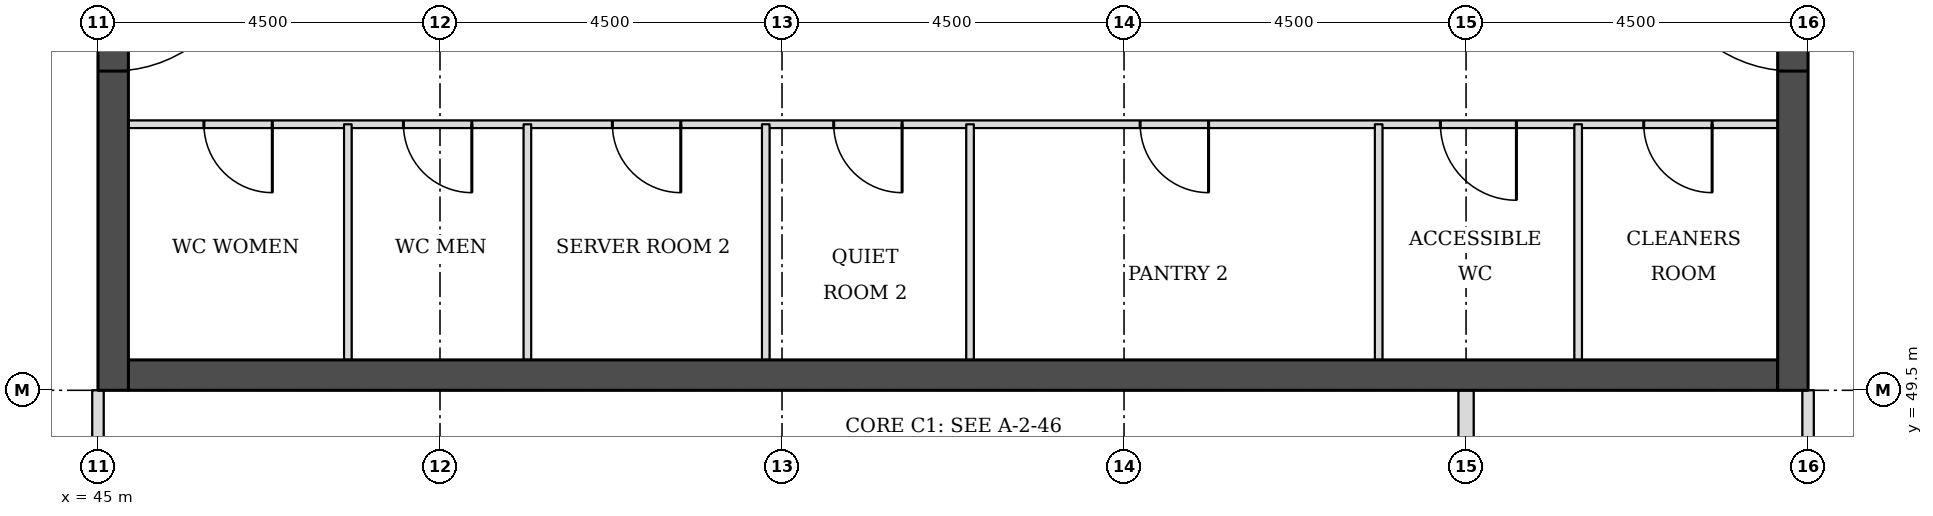
"""IFC4 building model, lengths in metres.
Left out: names, types, materials, properties, quantities, classifications, styles, units other than length and angle.
Written with IfcOpenShell. Run it as: python <this file> out.ifc"""

import sys

from ifc_helpers import new_model, si_unit, direction, frame, frame_2d, origin, place, context, subcontext, project, spatial, rectangle, extrude, element, fill, save


model = new_model("IFC4")
c1 = context("Model", 3, precision=1e-05, world=origin(), true_north=direction((0.0, 1.0)))
c2 = subcontext(c1, "Body", "Model", "MODEL_VIEW")
j1 = project(units=[si_unit("LENGTHUNIT", "METRE"), si_unit("PLANEANGLEUNIT", "RADIAN")], contexts=[c1])
p1 = place(None, origin())
s1 = spatial("IfcSite", under=j1, at=p1, CompositionType="ELEMENT")
p2 = place(p1, origin())
s2 = spatial("IfcBuilding", under=s1, at=p2, CompositionType="ELEMENT")
p3 = place(p2, frame((0.0, 0.0, 184.7)))
s3 = spatial("IfcBuildingStorey", under=s2, at=p3, CompositionType="ELEMENT", Elevation=184.7)
p4 = place(p3, frame((45.4, 49.7, 0.0), z_axis=(0.0, 0.0, 1.0), x_axis=(1.0, 0.0, 0.0)))
e1 = element("IfcWall", 1, at=p4, inside=s3, PredefinedType="SHEAR", context=c2, shape_type="SweptSolid", body=[
    extrude(rectangle(XDim=21.7, YDim=0.4, at=frame_2d((10.85, 0.0))), origin(), (0.0, 0.0, 1.0), 3.7),
])
p5 = place(p3, frame((45.2, 49.5, 0.0), z_axis=(0.0, 0.0, 1.0), x_axis=(0.0, 1.0, 0.0)))
e2 = element("IfcWall", 2, at=p5, inside=s3, PredefinedType="SHEAR", context=c2, shape_type="SweptSolid", body=[
    extrude(rectangle(XDim=22.5, YDim=0.4, at=frame_2d((11.25, 0.0))), origin(), (0.0, 0.0, 1.0), 3.7),
])
p6 = place(p5, frame((4.2, 0.0, 0.0)))
e3 = element("IfcOpeningElement", 3, at=p6, cuts=e2, PredefinedType="OPENING", context=c2, shape_type="SweptSolid", body=[
    extrude(rectangle(XDim=1.8, YDim=2.1, at=frame_2d((0.9, 1.05))), frame((0.0, 0.21, 0.0), z_axis=(0.0, -1.0, 0.0), x_axis=(1.0, 0.0, 0.0)), (0.0, 0.0, 1.0), 0.42),
])
p7 = place(p5, frame((6.9, 0.0, 0.0)))
e4 = element("IfcOpeningElement", 4, at=p7, cuts=e2, PredefinedType="OPENING", context=c2, shape_type="SweptSolid", body=[
    extrude(rectangle(XDim=1.1, YDim=2.1, at=frame_2d((0.55, 1.05))), frame((0.0, 0.21, 0.0), z_axis=(0.0, -1.0, 0.0), x_axis=(1.0, 0.0, 0.0)), (0.0, 0.0, 1.0), 0.42),
])
p8 = place(p5, frame((13.6, 0.0, 0.0)))
e5 = element("IfcOpeningElement", 5, at=p8, cuts=e2, PredefinedType="OPENING", context=c2, shape_type="SweptSolid", body=[
    extrude(rectangle(XDim=1.1, YDim=2.1, at=frame_2d((0.55, 1.05))), frame((0.0, 0.21, 0.0), z_axis=(0.0, -1.0, 0.0), x_axis=(1.0, 0.0, 0.0)), (0.0, 0.0, 1.0), 0.42),
])
p9 = place(p5, frame((16.5, 0.0, 0.0)))
e6 = element("IfcOpeningElement", 6, at=p9, cuts=e2, PredefinedType="OPENING", context=c2, shape_type="SweptSolid", body=[
    extrude(rectangle(XDim=1.8, YDim=2.1, at=frame_2d((0.9, 1.05))), frame((0.0, 0.21, 0.0), z_axis=(0.0, -1.0, 0.0), x_axis=(1.0, 0.0, 0.0)), (0.0, 0.0, 1.0), 0.42),
])
p10 = place(p3, frame((67.3, 49.5, 0.0), z_axis=(0.0, 0.0, 1.0), x_axis=(0.0, 1.0, 0.0)))
e7 = element("IfcWall", 7, at=p10, inside=s3, PredefinedType="SHEAR", context=c2, shape_type="SweptSolid", body=[
    extrude(rectangle(XDim=22.5, YDim=0.4, at=frame_2d((11.25, 0.0))), origin(), (0.0, 0.0, 1.0), 3.7),
])
p11 = place(p10, frame((4.2, 0.0, 0.0)))
e8 = element("IfcOpeningElement", 8, at=p11, cuts=e7, PredefinedType="OPENING", context=c2, shape_type="SweptSolid", body=[
    extrude(rectangle(XDim=1.8, YDim=2.1, at=frame_2d((0.9, 1.05))), frame((0.0, 0.21, 0.0), z_axis=(0.0, -1.0, 0.0), x_axis=(1.0, 0.0, 0.0)), (0.0, 0.0, 1.0), 0.42),
])
p12 = place(p10, frame((6.9, 0.0, 0.0)))
e9 = element("IfcOpeningElement", 9, at=p12, cuts=e7, PredefinedType="OPENING", context=c2, shape_type="SweptSolid", body=[
    extrude(rectangle(XDim=1.1, YDim=2.1, at=frame_2d((0.55, 1.05))), frame((0.0, 0.21, 0.0), z_axis=(0.0, -1.0, 0.0), x_axis=(1.0, 0.0, 0.0)), (0.0, 0.0, 1.0), 0.42),
])
p13 = place(p10, frame((13.6, 0.0, 0.0)))
e10 = element("IfcOpeningElement", 10, at=p13, cuts=e7, PredefinedType="OPENING", context=c2, shape_type="SweptSolid", body=[
    extrude(rectangle(XDim=1.1, YDim=2.1, at=frame_2d((0.55, 1.05))), frame((0.0, 0.21, 0.0), z_axis=(0.0, -1.0, 0.0), x_axis=(1.0, 0.0, 0.0)), (0.0, 0.0, 1.0), 0.42),
])
p14 = place(p10, frame((16.5, 0.0, 0.0)))
e11 = element("IfcOpeningElement", 11, at=p14, cuts=e7, PredefinedType="OPENING", context=c2, shape_type="SweptSolid", body=[
    extrude(rectangle(XDim=1.8, YDim=2.1, at=frame_2d((0.9, 1.05))), frame((0.0, 0.21, 0.0), z_axis=(0.0, -1.0, 0.0), x_axis=(1.0, 0.0, 0.0)), (0.0, 0.0, 1.0), 0.42),
])
p15 = place(p3, frame((67.5, 45.0, 0.0), z_axis=(0.0, 0.0, 1.0), x_axis=(0.0, 1.0, 0.0)))
e12 = element("IfcWall", 12, at=p15, inside=s3, PredefinedType="PARTITIONING", context=c2, shape_type="SweptSolid", body=[
    extrude(rectangle(XDim=4.5, YDim=0.15, at=frame_2d((2.25, 0.0))), origin(), (0.0, 0.0, 1.0), 3.022),
])
p16 = place(p3, frame((63.0, 46.5, 0.0), z_axis=(0.0, 0.0, 1.0), x_axis=(0.0, 1.0, 0.0)))
e13 = element("IfcWall", 13, at=p16, inside=s3, PredefinedType="PARTITIONING", context=c2, shape_type="SweptSolid", body=[
    extrude(rectangle(XDim=3.0, YDim=0.2, at=frame_2d((1.5, 0.0))), origin(), (0.0, 0.0, 1.0), 3.55),
])
p17 = place(p3, frame((45.0, 48.0, 0.0), z_axis=(0.0, 0.0, 1.0), x_axis=(0.0, 1.0, 0.0)))
e14 = element("IfcWall", 14, at=p17, inside=s3, PredefinedType="PARTITIONING", context=c2, shape_type="SweptSolid", body=[
    extrude(rectangle(XDim=1.5, YDim=0.15, at=frame_2d((0.75, 0.0))), origin(), (0.0, 0.0, 1.0), 3.022),
])
p18 = place(p3, frame((45.4, 53.0, 0.0), z_axis=(0.0, 0.0, 1.0), x_axis=(1.0, 0.0, 0.0)))
e15 = element("IfcWall", 15, at=p18, inside=s3, PredefinedType="PARTITIONING", context=c2, shape_type="SweptSolid", body=[
    extrude(rectangle(XDim=21.7, YDim=0.1, at=frame_2d((10.85, 0.0))), origin(), (0.0, 0.0, 1.0), 3.55),
])
p19 = place(p18, frame((19.938, 0.0, 0.0)))
e16 = element("IfcOpeningElement", 16, at=p19, cuts=e15, PredefinedType="OPENING", context=c2, shape_type="SweptSolid", body=[
    extrude(rectangle(XDim=0.9, YDim=2.1, at=frame_2d((0.45, 1.05))), frame((0.0, 0.06, 0.0), z_axis=(0.0, -1.0, 0.0), x_axis=(1.0, 0.0, 0.0)), (0.0, 0.0, 1.0), 0.12),
])
p20 = place(p18, frame((17.262, 0.0, 0.0)))
e17 = element("IfcOpeningElement", 17, at=p20, cuts=e15, PredefinedType="OPENING", context=c2, shape_type="SweptSolid", body=[
    extrude(rectangle(XDim=1.0, YDim=2.1, at=frame_2d((0.5, 1.05))), frame((0.0, 0.06, 0.0), z_axis=(0.0, -1.0, 0.0), x_axis=(1.0, 0.0, 0.0)), (0.0, 0.0, 1.0), 0.12),
])
p21 = place(p18, frame((0.994, 0.0, 0.0)))
e18 = element("IfcOpeningElement", 18, at=p21, cuts=e15, PredefinedType="OPENING", context=c2, shape_type="SweptSolid", body=[
    extrude(rectangle(XDim=0.9, YDim=2.1, at=frame_2d((0.45, 1.05))), frame((0.0, 0.06, 0.0), z_axis=(0.0, -1.0, 0.0), x_axis=(1.0, 0.0, 0.0)), (0.0, 0.0, 1.0), 0.12),
])
p22 = place(p18, frame((3.619, 0.0, 0.0)))
e19 = element("IfcOpeningElement", 19, at=p22, cuts=e15, PredefinedType="OPENING", context=c2, shape_type="SweptSolid", body=[
    extrude(rectangle(XDim=0.9, YDim=2.1, at=frame_2d((0.45, 1.05))), frame((0.0, 0.06, 0.0), z_axis=(0.0, -1.0, 0.0), x_axis=(1.0, 0.0, 0.0)), (0.0, 0.0, 1.0), 0.12),
])
p23 = place(p18, frame((6.368, 0.0, 0.0)))
e20 = element("IfcOpeningElement", 20, at=p23, cuts=e15, PredefinedType="OPENING", context=c2, shape_type="SweptSolid", body=[
    extrude(rectangle(XDim=0.9, YDim=2.1, at=frame_2d((0.45, 1.05))), frame((0.0, 0.06, 0.0), z_axis=(0.0, -1.0, 0.0), x_axis=(1.0, 0.0, 0.0)), (0.0, 0.0, 1.0), 0.12),
])
p24 = place(p18, frame((9.28, 0.0, 0.0)))
e21 = element("IfcOpeningElement", 21, at=p24, cuts=e15, PredefinedType="OPENING", context=c2, shape_type="SweptSolid", body=[
    extrude(rectangle(XDim=0.9, YDim=2.1, at=frame_2d((0.45, 1.05))), frame((0.0, 0.06, 0.0), z_axis=(0.0, -1.0, 0.0), x_axis=(1.0, 0.0, 0.0)), (0.0, 0.0, 1.0), 0.12),
])
p25 = place(p18, frame((13.312, 0.0, 0.0)))
e22 = element("IfcOpeningElement", 22, at=p25, cuts=e15, PredefinedType="OPENING", context=c2, shape_type="SweptSolid", body=[
    extrude(rectangle(XDim=0.9, YDim=2.1, at=frame_2d((0.45, 1.05))), frame((0.0, 0.06, 0.0), z_axis=(0.0, -1.0, 0.0), x_axis=(1.0, 0.0, 0.0)), (0.0, 0.0, 1.0), 0.12),
])
for number, where, z_axis, x_axis in (
    (23, (48.288, 49.9, 0.0), (0.0, 0.0, 1.0), (0.0, 1.0, 0.0)),
    (24, (50.65, 49.9, 0.0), (0.0, 0.0, 1.0), (0.0, 1.0, 0.0)),
    (25, (53.786, 49.9, 0.0), (0.0, 0.0, 1.0), (0.0, 1.0, 0.0)),
    (26, (56.474, 49.9, 0.0), (0.0, 0.0, 1.0), (0.0, 1.0, 0.0)),
    (27, (61.85, 49.9, 0.0), (0.0, 0.0, 1.0), (0.0, 1.0, 0.0)),
    (28, (64.475, 49.9, 0.0), (0.0, 0.0, 1.0), (0.0, 1.0, 0.0)),
):
    element("IfcWall", number, at=place(p3, frame(where, z_axis=z_axis, x_axis=x_axis)), inside=s3, PredefinedType="PARTITIONING", context=c2, shape_type="SweptSolid", body=[
        extrude(rectangle(XDim=3.1, YDim=0.1, at=frame_2d((1.55, 0.0))), origin(), (0.0, 0.0, 1.0), 3.55),
    ])
p26 = place(p6, frame((1.8, 0.0, 0.0), z_axis=(0.0, 0.0, 1.0), x_axis=(-1.0, 0.0, 0.0)))
e29 = element("IfcDoor", 29, at=p26, inside=s3, OperationType="SINGLE_SWING_LEFT", PredefinedType="DOOR", context=c2, shape_type="SweptSolid", body=[
    extrude(rectangle(XDim=1.8, YDim=2.1, at=frame_2d((0.9, 1.05))), frame((0.0, 0.025, 0.0), z_axis=(0.0, -1.0, 0.0), x_axis=(1.0, 0.0, 0.0)), (0.0, 0.0, 1.0), 0.05),
])
fill(e3, e29)
p27 = place(p11, origin())
e30 = element("IfcDoor", 30, at=p27, inside=s3, OperationType="SINGLE_SWING_RIGHT", PredefinedType="DOOR", context=c2, shape_type="SweptSolid", body=[
    extrude(rectangle(XDim=1.8, YDim=2.1, at=frame_2d((0.9, 1.05))), frame((0.0, 0.025, 0.0), z_axis=(0.0, -1.0, 0.0), x_axis=(1.0, 0.0, 0.0)), (0.0, 0.0, 1.0), 0.05),
])
fill(e8, e30)
p28 = place(p19, frame((0.9, 0.0, 0.0), z_axis=(0.0, 0.0, 1.0), x_axis=(-1.0, 0.0, 0.0)))
e31 = element("IfcDoor", 31, at=p28, inside=s3, OperationType="SINGLE_SWING_LEFT", PredefinedType="DOOR", context=c2, shape_type="SweptSolid", body=[
    extrude(rectangle(XDim=0.9, YDim=2.1, at=frame_2d((0.45, 1.05))), frame((0.0, 0.025, 0.0), z_axis=(0.0, -1.0, 0.0), x_axis=(1.0, 0.0, 0.0)), (0.0, 0.0, 1.0), 0.05),
])
fill(e16, e31)
p29 = place(p20, frame((1.0, 0.0, 0.0), z_axis=(0.0, 0.0, 1.0), x_axis=(-1.0, 0.0, 0.0)))
e32 = element("IfcDoor", 32, at=p29, inside=s3, OperationType="SINGLE_SWING_LEFT", PredefinedType="DOOR", context=c2, shape_type="SweptSolid", body=[
    extrude(rectangle(XDim=1.0, YDim=2.1, at=frame_2d((0.5, 1.05))), frame((0.0, 0.025, 0.0), z_axis=(0.0, -1.0, 0.0), x_axis=(1.0, 0.0, 0.0)), (0.0, 0.0, 1.0), 0.05),
])
fill(e17, e32)
p30 = place(p21, frame((0.9, 0.0, 0.0), z_axis=(0.0, 0.0, 1.0), x_axis=(-1.0, 0.0, 0.0)))
e33 = element("IfcDoor", 33, at=p30, inside=s3, OperationType="SINGLE_SWING_LEFT", PredefinedType="DOOR", context=c2, shape_type="SweptSolid", body=[
    extrude(rectangle(XDim=0.9, YDim=2.1, at=frame_2d((0.45, 1.05))), frame((0.0, 0.025, 0.0), z_axis=(0.0, -1.0, 0.0), x_axis=(1.0, 0.0, 0.0)), (0.0, 0.0, 1.0), 0.05),
])
fill(e18, e33)
p31 = place(p22, frame((0.9, 0.0, 0.0), z_axis=(0.0, 0.0, 1.0), x_axis=(-1.0, 0.0, 0.0)))
e34 = element("IfcDoor", 34, at=p31, inside=s3, OperationType="SINGLE_SWING_LEFT", PredefinedType="DOOR", context=c2, shape_type="SweptSolid", body=[
    extrude(rectangle(XDim=0.9, YDim=2.1, at=frame_2d((0.45, 1.05))), frame((0.0, 0.025, 0.0), z_axis=(0.0, -1.0, 0.0), x_axis=(1.0, 0.0, 0.0)), (0.0, 0.0, 1.0), 0.05),
])
fill(e19, e34)
p32 = place(p23, frame((0.9, 0.0, 0.0), z_axis=(0.0, 0.0, 1.0), x_axis=(-1.0, 0.0, 0.0)))
e35 = element("IfcDoor", 35, at=p32, inside=s3, OperationType="SINGLE_SWING_LEFT", PredefinedType="DOOR", context=c2, shape_type="SweptSolid", body=[
    extrude(rectangle(XDim=0.9, YDim=2.1, at=frame_2d((0.45, 1.05))), frame((0.0, 0.025, 0.0), z_axis=(0.0, -1.0, 0.0), x_axis=(1.0, 0.0, 0.0)), (0.0, 0.0, 1.0), 0.05),
])
fill(e20, e35)
p33 = place(p24, frame((0.9, 0.0, 0.0), z_axis=(0.0, 0.0, 1.0), x_axis=(-1.0, 0.0, 0.0)))
e36 = element("IfcDoor", 36, at=p33, inside=s3, OperationType="SINGLE_SWING_LEFT", PredefinedType="DOOR", context=c2, shape_type="SweptSolid", body=[
    extrude(rectangle(XDim=0.9, YDim=2.1, at=frame_2d((0.45, 1.05))), frame((0.0, 0.025, 0.0), z_axis=(0.0, -1.0, 0.0), x_axis=(1.0, 0.0, 0.0)), (0.0, 0.0, 1.0), 0.05),
])
fill(e21, e36)
p34 = place(p25, frame((0.9, 0.0, 0.0), z_axis=(0.0, 0.0, 1.0), x_axis=(-1.0, 0.0, 0.0)))
e37 = element("IfcDoor", 37, at=p34, inside=s3, OperationType="SINGLE_SWING_LEFT", PredefinedType="DOOR", context=c2, shape_type="SweptSolid", body=[
    extrude(rectangle(XDim=0.9, YDim=2.1, at=frame_2d((0.45, 1.05))), frame((0.0, 0.025, 0.0), z_axis=(0.0, -1.0, 0.0), x_axis=(1.0, 0.0, 0.0)), (0.0, 0.0, 1.0), 0.05),
])
fill(e22, e37)
save(model, sys.argv[1])
